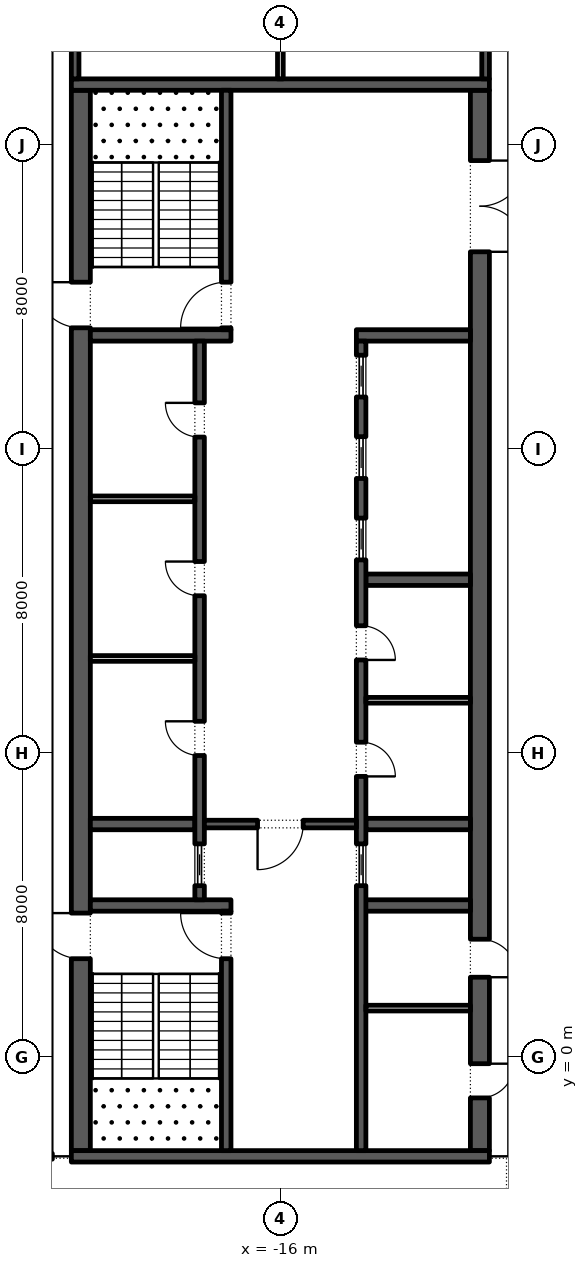
"""IFC4 building model, lengths in metres.
Left out: names, types, materials, properties, quantities, classifications, styles, units other than length and angle.
Written with IfcOpenShell. Run it as: python <this file> out.ifc"""

import sys

from ifc_helpers import new_model, si_unit, direction, frame, frame_2d, origin, place, context, subcontext, project, spatial, rectangle, extrude, element, fill, save


model = new_model("IFC4")
c1 = context("Model", 3, precision=1e-05, world=origin(), true_north=direction((0.0, 1.0)))
c2 = subcontext(c1, "Body", "Model", "MODEL_VIEW")
j1 = project(units=[si_unit("LENGTHUNIT", "METRE"), si_unit("PLANEANGLEUNIT", "RADIAN")], contexts=[c1])
p1 = place(None, origin())
s1 = spatial("IfcSite", under=j1, at=p1, CompositionType="ELEMENT")
p2 = place(p1, origin())
s2 = spatial("IfcBuilding", under=s1, at=p2, CompositionType="ELEMENT")
p3 = place(p2, frame((0.0, 0.0, 321.6)))
s3 = spatial("IfcBuildingStorey", under=s2, at=p3, CompositionType="ELEMENT", Elevation=321.6)
p4 = place(p3, frame((-21.25, -2.45, 0.0), z_axis=(0.0, 0.0, 1.0), x_axis=(0.0, 1.0, 0.0)))
e1 = element("IfcWall", 1, at=p4, inside=s3, PredefinedType="SHEAR", context=c2, shape_type="SweptSolid", body=[
    extrude(rectangle(XDim=27.9, YDim=0.5, at=frame_2d((13.95, 0.0))), origin(), (0.0, 0.0, 1.0), 4.0),
])
p5 = place(p4, frame((5.05, 0.0, 0.0)))
e2 = element("IfcOpeningElement", 2, at=p5, cuts=e1, PredefinedType="OPENING", context=c2, shape_type="SweptSolid", body=[
    extrude(rectangle(XDim=1.2, YDim=2.1, at=frame_2d((0.6, 1.05))), frame((0.0, 0.26, 0.0), z_axis=(0.0, -1.0, 0.0), x_axis=(1.0, 0.0, 0.0)), (0.0, 0.0, 1.0), 0.52),
])
p6 = place(p4, frame((21.65, 0.0, 0.0)))
e3 = element("IfcOpeningElement", 3, at=p6, cuts=e1, PredefinedType="OPENING", context=c2, shape_type="SweptSolid", body=[
    extrude(rectangle(XDim=1.2, YDim=2.1, at=frame_2d((0.6, 1.05))), frame((0.0, 0.26, 0.0), z_axis=(0.0, -1.0, 0.0), x_axis=(1.0, 0.0, 0.0)), (0.0, 0.0, 1.0), 0.52),
])
p7 = place(p3, frame((-10.75, -2.45, 0.0), z_axis=(0.0, 0.0, 1.0), x_axis=(0.0, 1.0, 0.0)))
e4 = element("IfcWall", 4, at=p7, inside=s3, PredefinedType="SHEAR", context=c2, shape_type="SweptSolid", body=[
    extrude(rectangle(XDim=27.9, YDim=0.5, at=frame_2d((13.95, 0.0))), origin(), (0.0, 0.0, 1.0), 4.0),
])
p8 = place(p7, frame((23.65, 0.0, 0.0)))
e5 = element("IfcOpeningElement", 5, at=p8, cuts=e4, PredefinedType="OPENING", context=c2, shape_type="SweptSolid", body=[
    extrude(rectangle(XDim=2.4, YDim=2.1, at=frame_2d((1.2, 1.05))), frame((0.0, 0.26, 0.0), z_axis=(0.0, -1.0, 0.0), x_axis=(1.0, 0.0, 0.0)), (0.0, 0.0, 1.0), 0.52),
])
p9 = place(p7, frame((1.387, 0.0, 0.0)))
e6 = element("IfcOpeningElement", 6, at=p9, cuts=e4, PredefinedType="OPENING", context=c2, shape_type="SweptSolid", body=[
    extrude(rectangle(XDim=0.9, YDim=2.1, at=frame_2d((0.45, 1.05))), frame((0.0, 0.26, 0.0), z_axis=(0.0, -1.0, 0.0), x_axis=(1.0, 0.0, 0.0)), (0.0, 0.0, 1.0), 0.52),
])
p10 = place(p7, frame((4.562, 0.0, 0.0)))
e7 = element("IfcOpeningElement", 7, at=p10, cuts=e4, PredefinedType="OPENING", context=c2, shape_type="SweptSolid", body=[
    extrude(rectangle(XDim=1.0, YDim=2.1, at=frame_2d((0.5, 1.05))), frame((0.0, 0.26, 0.0), z_axis=(0.0, -1.0, 0.0), x_axis=(1.0, 0.0, 0.0)), (0.0, 0.0, 1.0), 0.52),
])
for number, where, z_axis, x_axis in (
    (8, (-21.5, -2.6, 0.0), (0.0, 0.0, 1.0), (1.0, 0.0, 0.0)),
    (9, (-21.5, 25.6, 0.0), (0.0, 0.0, 1.0), (1.0, 0.0, 0.0)),
):
    element("IfcWall", number, at=place(p3, frame(where, z_axis=z_axis, x_axis=x_axis)), inside=s3, PredefinedType="SHEAR", context=c2, shape_type="SweptSolid", body=[
        extrude(rectangle(XDim=11.0, YDim=0.3, at=frame_2d((5.5, 0.0))), origin(), (0.0, 0.0, 1.0), 4.0),
    ])
p11 = place(p3, frame((-21.0, 4.0, 0.0), z_axis=(0.0, 0.0, 1.0), x_axis=(1.0, 0.0, 0.0)))
e10 = element("IfcWall", 10, at=p11, inside=s3, PredefinedType="SHEAR", context=c2, shape_type="SweptSolid", body=[
    extrude(rectangle(XDim=3.7, YDim=0.3, at=frame_2d((1.85, 0.0))), origin(), (0.0, 0.0, 1.0), 4.0),
])
p12 = place(p3, frame((-17.425, -2.45, 0.0), z_axis=(0.0, 0.0, 1.0), x_axis=(0.0, 1.0, 0.0)))
e11 = element("IfcWall", 11, at=p12, inside=s3, PredefinedType="SHEAR", context=c2, shape_type="SweptSolid", body=[
    extrude(rectangle(XDim=6.3, YDim=0.25, at=frame_2d((3.15, 0.0))), origin(), (0.0, 0.0, 1.0), 4.0),
])
p13 = place(p12, frame((5.05, 0.0, 0.0)))
e12 = element("IfcOpeningElement", 12, at=p13, cuts=e11, PredefinedType="OPENING", context=c2, shape_type="SweptSolid", body=[
    extrude(rectangle(XDim=1.2, YDim=2.1, at=frame_2d((0.6, 1.05))), frame((0.0, 0.135, 0.0), z_axis=(0.0, -1.0, 0.0), x_axis=(1.0, 0.0, 0.0)), (0.0, 0.0, 1.0), 0.27),
])
p14 = place(p3, frame((-21.0, 19.0, 0.0), z_axis=(0.0, 0.0, 1.0), x_axis=(1.0, 0.0, 0.0)))
e13 = element("IfcWall", 13, at=p14, inside=s3, PredefinedType="SHEAR", context=c2, shape_type="SweptSolid", body=[
    extrude(rectangle(XDim=3.7, YDim=0.3, at=frame_2d((1.85, 0.0))), origin(), (0.0, 0.0, 1.0), 4.0),
])
p15 = place(p3, frame((-17.425, 19.15, 0.0), z_axis=(0.0, 0.0, 1.0), x_axis=(0.0, 1.0, 0.0)))
e14 = element("IfcWall", 14, at=p15, inside=s3, PredefinedType="SHEAR", context=c2, shape_type="SweptSolid", body=[
    extrude(rectangle(XDim=6.3, YDim=0.25, at=frame_2d((3.15, 0.0))), origin(), (0.0, 0.0, 1.0), 4.0),
])
p16 = place(p15, frame((0.05, 0.0, 0.0)))
e15 = element("IfcOpeningElement", 15, at=p16, cuts=e14, PredefinedType="OPENING", context=c2, shape_type="SweptSolid", body=[
    extrude(rectangle(XDim=1.2, YDim=2.1, at=frame_2d((0.6, 1.05))), frame((0.0, 0.135, 0.0), z_axis=(0.0, -1.0, 0.0), x_axis=(1.0, 0.0, 0.0)), (0.0, 0.0, 1.0), 0.27),
])
p17 = place(p3, frame((-21.0, 6.143, 0.0), z_axis=(0.0, 0.0, 1.0), x_axis=(1.0, 0.0, 0.0)))
e16 = element("IfcWall", 16, at=p17, inside=s3, PredefinedType="SHEAR", context=c2, shape_type="SweptSolid", body=[
    extrude(rectangle(XDim=2.75, YDim=0.3, at=frame_2d((1.375, 0.0))), origin(), (0.0, 0.0, 1.0), 4.0),
])
p18 = place(p3, frame((-18.125, 4.15, 0.0), z_axis=(0.0, 0.0, 1.0), x_axis=(0.0, 1.0, 0.0)))
e17 = element("IfcWall", 17, at=p18, inside=s3, PredefinedType="SHEAR", context=c2, shape_type="SweptSolid", body=[
    extrude(rectangle(XDim=14.7, YDim=0.25, at=frame_2d((7.35, 0.0))), origin(), (0.0, 0.0, 1.0), 4.0),
])
p19 = place(p18, frame((3.796, 0.0, 0.0)))
e18 = element("IfcOpeningElement", 18, at=p19, cuts=e17, PredefinedType="OPENING", context=c2, shape_type="SweptSolid", body=[
    extrude(rectangle(XDim=0.9, YDim=2.1, at=frame_2d((0.45, 1.05))), frame((0.0, 0.135, 0.0), z_axis=(0.0, -1.0, 0.0), x_axis=(1.0, 0.0, 0.0)), (0.0, 0.0, 1.0), 0.27),
])
p20 = place(p18, frame((8.0, 0.0, 0.0)))
e19 = element("IfcOpeningElement", 19, at=p20, cuts=e17, PredefinedType="OPENING", context=c2, shape_type="SweptSolid", body=[
    extrude(rectangle(XDim=0.9, YDim=2.1, at=frame_2d((0.45, 1.05))), frame((0.0, 0.135, 0.0), z_axis=(0.0, -1.0, 0.0), x_axis=(1.0, 0.0, 0.0)), (0.0, 0.0, 1.0), 0.27),
])
p21 = place(p18, frame((12.175, 0.0, 0.0)))
e20 = element("IfcOpeningElement", 20, at=p21, cuts=e17, PredefinedType="OPENING", context=c2, shape_type="SweptSolid", body=[
    extrude(rectangle(XDim=0.9, YDim=2.1, at=frame_2d((0.45, 1.05))), frame((0.0, 0.135, 0.0), z_axis=(0.0, -1.0, 0.0), x_axis=(1.0, 0.0, 0.0)), (0.0, 0.0, 1.0), 0.27),
])
p22 = place(p18, frame((0.371, 0.0, 0.0)))
e21 = element("IfcOpeningElement", 21, at=p22, cuts=e17, PredefinedType="OPENING", context=c2, shape_type="SweptSolid", body=[
    extrude(rectangle(XDim=1.1, YDim=2.1, at=frame_2d((0.55, 1.05))), frame((0.0, 0.135, 0.0), z_axis=(0.0, -1.0, 0.0), x_axis=(1.0, 0.0, 0.0)), (0.0, 0.0, 1.0), 0.27),
])
for number, where, z_axis, x_axis in (
    (22, (-21.0, 10.5, 0.0), (0.0, 0.0, 1.0), (1.0, 0.0, 0.0)),
    (23, (-21.0, 14.7, 0.0), (0.0, 0.0, 1.0), (1.0, 0.0, 0.0)),
):
    element("IfcWall", number, at=place(p3, frame(where, z_axis=z_axis, x_axis=x_axis)), inside=s3, PredefinedType="PARTITIONING", context=c2, shape_type="SweptSolid", body=[
        extrude(rectangle(XDim=2.75, YDim=0.15, at=frame_2d((1.375, 0.0))), origin(), (0.0, 0.0, 1.0), 4.0),
    ])
p23 = place(p3, frame((-14.0, 4.0, 0.0), z_axis=(0.0, 0.0, 1.0), x_axis=(1.0, 0.0, 0.0)))
e24 = element("IfcWall", 24, at=p23, inside=s3, PredefinedType="SHEAR", context=c2, shape_type="SweptSolid", body=[
    extrude(rectangle(XDim=3.0, YDim=0.3, at=frame_2d((1.5, 0.0))), origin(), (0.0, 0.0, 1.0), 4.0),
])
for number, where, z_axis, x_axis in (
    (25, (-13.75, 6.143, 0.0), (0.0, 0.0, 1.0), (1.0, 0.0, 0.0)),
    (26, (-13.75, 12.571, 0.0), (0.0, 0.0, 1.0), (1.0, 0.0, 0.0)),
):
    element("IfcWall", number, at=place(p3, frame(where, z_axis=z_axis, x_axis=x_axis)), inside=s3, PredefinedType="SHEAR", context=c2, shape_type="SweptSolid", body=[
        extrude(rectangle(XDim=2.75, YDim=0.3, at=frame_2d((1.375, 0.0))), origin(), (0.0, 0.0, 1.0), 4.0),
    ])
p24 = place(p3, frame((-14.0, 19.0, 0.0), z_axis=(0.0, 0.0, 1.0), x_axis=(1.0, 0.0, 0.0)))
e27 = element("IfcWall", 27, at=p24, inside=s3, PredefinedType="SHEAR", context=c2, shape_type="SweptSolid", body=[
    extrude(rectangle(XDim=3.0, YDim=0.3, at=frame_2d((1.5, 0.0))), origin(), (0.0, 0.0, 1.0), 4.0),
])
p25 = place(p3, frame((-13.875, -2.45, 0.0), z_axis=(0.0, 0.0, 1.0), x_axis=(0.0, 1.0, 0.0)))
e28 = element("IfcWall", 28, at=p25, inside=s3, PredefinedType="SHEAR", context=c2, shape_type="SweptSolid", body=[
    extrude(rectangle(XDim=21.3, YDim=0.25, at=frame_2d((10.65, 0.0))), origin(), (0.0, 0.0, 1.0), 4.0),
])
p26 = place(p25, frame((9.846, 0.0, 0.0)))
e29 = element("IfcOpeningElement", 29, at=p26, cuts=e28, PredefinedType="OPENING", context=c2, shape_type="SweptSolid", body=[
    extrude(rectangle(XDim=0.9, YDim=2.1, at=frame_2d((0.45, 1.05))), frame((0.0, 0.135, 0.0), z_axis=(0.0, -1.0, 0.0), x_axis=(1.0, 0.0, 0.0)), (0.0, 0.0, 1.0), 0.27),
])
p27 = place(p25, frame((12.911, 0.0, 0.0)))
e30 = element("IfcOpeningElement", 30, at=p27, cuts=e28, PredefinedType="OPENING", context=c2, shape_type="SweptSolid", body=[
    extrude(rectangle(XDim=0.9, YDim=2.1, at=frame_2d((0.45, 1.05))), frame((0.0, 0.135, 0.0), z_axis=(0.0, -1.0, 0.0), x_axis=(1.0, 0.0, 0.0)), (0.0, 0.0, 1.0), 0.27),
])
p28 = place(p25, frame((6.971, 0.0, 0.0)))
e31 = element("IfcOpeningElement", 31, at=p28, cuts=e28, PredefinedType="OPENING", context=c2, shape_type="SweptSolid", body=[
    extrude(rectangle(XDim=1.1, YDim=2.1, at=frame_2d((0.55, 1.05))), frame((0.0, 0.135, 0.0), z_axis=(0.0, -1.0, 0.0), x_axis=(1.0, 0.0, 0.0)), (0.0, 0.0, 1.0), 0.27),
])
p29 = place(p25, frame((15.543, 0.0, 0.0)))
e32 = element("IfcOpeningElement", 32, at=p29, cuts=e28, PredefinedType="OPENING", context=c2, shape_type="SweptSolid", body=[
    extrude(rectangle(XDim=1.1, YDim=2.1, at=frame_2d((0.55, 1.05))), frame((0.0, 0.135, 0.0), z_axis=(0.0, -1.0, 0.0), x_axis=(1.0, 0.0, 0.0)), (0.0, 0.0, 1.0), 0.27),
])
p30 = place(p25, frame((17.686, 0.0, 0.0)))
e33 = element("IfcOpeningElement", 33, at=p30, cuts=e28, PredefinedType="OPENING", context=c2, shape_type="SweptSolid", body=[
    extrude(rectangle(XDim=1.1, YDim=2.1, at=frame_2d((0.55, 1.05))), frame((0.0, 0.135, 0.0), z_axis=(0.0, -1.0, 0.0), x_axis=(1.0, 0.0, 0.0)), (0.0, 0.0, 1.0), 0.27),
])
p31 = place(p25, frame((19.829, 0.0, 0.0)))
e34 = element("IfcOpeningElement", 34, at=p31, cuts=e28, PredefinedType="OPENING", context=c2, shape_type="SweptSolid", body=[
    extrude(rectangle(XDim=1.1, YDim=2.1, at=frame_2d((0.55, 1.05))), frame((0.0, 0.135, 0.0), z_axis=(0.0, -1.0, 0.0), x_axis=(1.0, 0.0, 0.0)), (0.0, 0.0, 1.0), 0.27),
])
p32 = place(p3, frame((-13.75, 9.4, 0.0), z_axis=(0.0, 0.0, 1.0), x_axis=(1.0, 0.0, 0.0)))
e35 = element("IfcWall", 35, at=p32, inside=s3, PredefinedType="PARTITIONING", context=c2, shape_type="SweptSolid", body=[
    extrude(rectangle(XDim=2.75, YDim=0.15, at=frame_2d((1.375, 0.0))), origin(), (0.0, 0.0, 1.0), 4.0),
])
p33 = place(p3, frame((-18.0, 6.143, 0.0), z_axis=(0.0, 0.0, 1.0), x_axis=(1.0, 0.0, 0.0)))
e36 = element("IfcWall", 36, at=p33, inside=s3, PredefinedType="SHEAR", context=c2, shape_type="SweptSolid", body=[
    extrude(rectangle(XDim=4.0, YDim=0.2, at=frame_2d((2.0, 0.0))), origin(), (0.0, 0.0, 1.0), 4.0),
])
p34 = place(p33, frame((1.4, 0.0, 0.0)))
e37 = element("IfcOpeningElement", 37, at=p34, cuts=e36, PredefinedType="OPENING", context=c2, shape_type="SweptSolid", body=[
    extrude(rectangle(XDim=1.2, YDim=2.1, at=frame_2d((0.6, 1.05))), frame((0.0, 0.11, 0.0), z_axis=(0.0, -1.0, 0.0), x_axis=(1.0, 0.0, 0.0)), (0.0, 0.0, 1.0), 0.22),
])
p35 = place(p3, frame((-13.75, 1.3, 0.0), z_axis=(0.0, 0.0, 1.0), x_axis=(1.0, 0.0, 0.0)))
e38 = element("IfcWall", 38, at=p35, inside=s3, PredefinedType="PARTITIONING", context=c2, shape_type="SweptSolid", body=[
    extrude(rectangle(XDim=2.75, YDim=0.15, at=frame_2d((1.375, 0.0))), origin(), (0.0, 0.0, 1.0), 4.0),
])
p36 = place(p3, frame((-21.4, 25.75, 0.0), z_axis=(0.0, 0.0, 1.0), x_axis=(0.0, 1.0, 0.0)))
e39 = element("IfcWall", 39, at=p36, inside=s3, PredefinedType="SHEAR", context=c2, shape_type="SweptSolid", body=[
    extrude(rectangle(XDim=15.05, YDim=0.2, at=frame_2d((7.525, 0.0))), origin(), (0.0, 0.0, 1.0), 4.0),
])
p37 = place(p36, frame((7.075, 0.0, 0.0)))
e40 = element("IfcOpeningElement", 40, at=p37, cuts=e39, PredefinedType="OPENING", context=c2, shape_type="SweptSolid", body=[
    extrude(rectangle(XDim=0.9, YDim=2.1, at=frame_2d((0.45, 1.05))), frame((0.0, 0.11, 0.0), z_axis=(0.0, -1.0, 0.0), x_axis=(1.0, 0.0, 0.0)), (0.0, 0.0, 1.0), 0.22),
])
p38 = place(p3, frame((-10.6, 25.75, 0.0), z_axis=(0.0, 0.0, 1.0), x_axis=(0.0, 1.0, 0.0)))
e41 = element("IfcWall", 41, at=p38, inside=s3, PredefinedType="SHEAR", context=c2, shape_type="SweptSolid", body=[
    extrude(rectangle(XDim=15.05, YDim=0.2, at=frame_2d((7.525, 0.0))), origin(), (0.0, 0.0, 1.0), 4.0),
])
p39 = place(p38, frame((7.075, 0.0, 0.0)))
e42 = element("IfcOpeningElement", 42, at=p39, cuts=e41, PredefinedType="OPENING", context=c2, shape_type="SweptSolid", body=[
    extrude(rectangle(XDim=0.9, YDim=2.1, at=frame_2d((0.45, 1.05))), frame((0.0, 0.11, 0.0), z_axis=(0.0, -1.0, 0.0), x_axis=(1.0, 0.0, 0.0)), (0.0, 0.0, 1.0), 0.22),
])
p40 = place(p3, frame((-16.0, 25.75, 0.0), z_axis=(0.0, 0.0, 1.0), x_axis=(0.0, 1.0, 0.0)))
e43 = element("IfcWall", 43, at=p40, inside=s3, PredefinedType="PARTITIONING", context=c2, shape_type="SweptSolid", body=[
    extrude(rectangle(XDim=15.05, YDim=0.15, at=frame_2d((7.525, 0.0))), origin(), (0.0, 0.0, 1.0), 4.0),
])
p41 = place(p19, origin())
e44 = element("IfcDoor", 44, at=p41, inside=s3, OperationType="SINGLE_SWING_LEFT", PredefinedType="DOOR", context=c2, shape_type="SweptSolid", body=[
    extrude(rectangle(XDim=0.9, YDim=2.1, at=frame_2d((0.45, 1.05))), frame((0.0, 0.125, 0.0), z_axis=(0.0, -1.0, 0.0), x_axis=(1.0, 0.0, 0.0)), (0.0, 0.0, 1.0), 0.05),
])
fill(e18, e44)
p42 = place(p20, origin())
e45 = element("IfcDoor", 45, at=p42, inside=s3, OperationType="SINGLE_SWING_LEFT", PredefinedType="DOOR", context=c2, shape_type="SweptSolid", body=[
    extrude(rectangle(XDim=0.9, YDim=2.1, at=frame_2d((0.45, 1.05))), frame((0.0, 0.125, 0.0), z_axis=(0.0, -1.0, 0.0), x_axis=(1.0, 0.0, 0.0)), (0.0, 0.0, 1.0), 0.05),
])
fill(e19, e45)
p43 = place(p21, origin())
e46 = element("IfcDoor", 46, at=p43, inside=s3, OperationType="SINGLE_SWING_LEFT", PredefinedType="DOOR", context=c2, shape_type="SweptSolid", body=[
    extrude(rectangle(XDim=0.9, YDim=2.1, at=frame_2d((0.45, 1.05))), frame((0.0, 0.125, 0.0), z_axis=(0.0, -1.0, 0.0), x_axis=(1.0, 0.0, 0.0)), (0.0, 0.0, 1.0), 0.05),
])
fill(e20, e46)
p44 = place(p22, origin())
e47 = element("IfcDoor", 47, at=p44, inside=s3, OperationType="SLIDING_TO_LEFT", PredefinedType="DOOR", context=c2, shape_type="SweptSolid", body=[
    extrude(rectangle(XDim=1.1, YDim=2.1, at=frame_2d((0.55, 1.05))), frame((0.0, 0.025, 0.0), z_axis=(0.0, -1.0, 0.0), x_axis=(1.0, 0.0, 0.0)), (0.0, 0.0, 1.0), 0.05),
])
fill(e21, e47)
p45 = place(p26, frame((0.9, -0.2, 0.0), z_axis=(0.0, 0.0, 1.0), x_axis=(-1.0, 0.0, 0.0)))
e48 = element("IfcDoor", 48, at=p45, inside=s3, OperationType="SINGLE_SWING_LEFT", PredefinedType="DOOR", context=c2, shape_type="SweptSolid", body=[
    extrude(rectangle(XDim=0.9, YDim=2.1, at=frame_2d((0.45, 1.05))), frame((0.0, -0.075, 0.0), z_axis=(0.0, -1.0, 0.0), x_axis=(1.0, 0.0, 0.0)), (0.0, 0.0, 1.0), 0.05),
])
fill(e29, e48)
p46 = place(p27, frame((0.9, -0.2, 0.0), z_axis=(0.0, 0.0, 1.0), x_axis=(-1.0, 0.0, 0.0)))
e49 = element("IfcDoor", 49, at=p46, inside=s3, OperationType="SINGLE_SWING_LEFT", PredefinedType="DOOR", context=c2, shape_type="SweptSolid", body=[
    extrude(rectangle(XDim=0.9, YDim=2.1, at=frame_2d((0.45, 1.05))), frame((0.0, -0.075, 0.0), z_axis=(0.0, -1.0, 0.0), x_axis=(1.0, 0.0, 0.0)), (0.0, 0.0, 1.0), 0.05),
])
fill(e30, e49)
p47 = place(p28, origin())
e50 = element("IfcDoor", 50, at=p47, inside=s3, OperationType="SLIDING_TO_LEFT", PredefinedType="DOOR", context=c2, shape_type="SweptSolid", body=[
    extrude(rectangle(XDim=1.1, YDim=2.1, at=frame_2d((0.55, 1.05))), frame((0.0, 0.025, 0.0), z_axis=(0.0, -1.0, 0.0), x_axis=(1.0, 0.0, 0.0)), (0.0, 0.0, 1.0), 0.05),
])
fill(e31, e50)
p48 = place(p29, origin())
e51 = element("IfcDoor", 51, at=p48, inside=s3, OperationType="SLIDING_TO_LEFT", PredefinedType="DOOR", context=c2, shape_type="SweptSolid", body=[
    extrude(rectangle(XDim=1.1, YDim=2.1, at=frame_2d((0.55, 1.05))), frame((0.0, 0.025, 0.0), z_axis=(0.0, -1.0, 0.0), x_axis=(1.0, 0.0, 0.0)), (0.0, 0.0, 1.0), 0.05),
])
fill(e32, e51)
p49 = place(p30, origin())
e52 = element("IfcDoor", 52, at=p49, inside=s3, OperationType="SLIDING_TO_LEFT", PredefinedType="DOOR", context=c2, shape_type="SweptSolid", body=[
    extrude(rectangle(XDim=1.1, YDim=2.1, at=frame_2d((0.55, 1.05))), frame((0.0, 0.025, 0.0), z_axis=(0.0, -1.0, 0.0), x_axis=(1.0, 0.0, 0.0)), (0.0, 0.0, 1.0), 0.05),
])
fill(e33, e52)
p50 = place(p31, origin())
e53 = element("IfcDoor", 53, at=p50, inside=s3, OperationType="SLIDING_TO_LEFT", PredefinedType="DOOR", context=c2, shape_type="SweptSolid", body=[
    extrude(rectangle(XDim=1.1, YDim=2.1, at=frame_2d((0.55, 1.05))), frame((0.0, 0.025, 0.0), z_axis=(0.0, -1.0, 0.0), x_axis=(1.0, 0.0, 0.0)), (0.0, 0.0, 1.0), 0.05),
])
fill(e34, e53)
p51 = place(p34, frame((1.2, 0.0, 0.0), z_axis=(0.0, 0.0, 1.0), x_axis=(-1.0, 0.0, 0.0)))
e54 = element("IfcDoor", 54, at=p51, inside=s3, OperationType="SINGLE_SWING_LEFT", PredefinedType="DOOR", context=c2, shape_type="SweptSolid", body=[
    extrude(rectangle(XDim=1.2, YDim=2.1, at=frame_2d((0.6, 1.05))), frame((0.0, 0.025, 0.0), z_axis=(0.0, -1.0, 0.0), x_axis=(1.0, 0.0, 0.0)), (0.0, 0.0, 1.0), 0.05),
])
fill(e37, e54)
p52 = place(p8, frame((2.4, 0.0, 0.0), z_axis=(0.0, 0.0, 1.0), x_axis=(-1.0, 0.0, 0.0)))
e55 = element("IfcDoor", 55, at=p52, inside=s3, OperationType="DOUBLE_DOOR_SINGLE_SWING", PredefinedType="DOOR", context=c2, shape_type="SweptSolid", body=[
    extrude(rectangle(XDim=2.4, YDim=2.1, at=frame_2d((1.2, 1.05))), frame((0.0, 0.025, 0.0), z_axis=(0.0, -1.0, 0.0), x_axis=(1.0, 0.0, 0.0)), (0.0, 0.0, 1.0), 0.05),
])
fill(e5, e55)
p53 = place(p13, origin())
e56 = element("IfcDoor", 56, at=p53, inside=s3, OperationType="SINGLE_SWING_LEFT", PredefinedType="DOOR", context=c2, shape_type="SweptSolid", body=[
    extrude(rectangle(XDim=1.2, YDim=2.1, at=frame_2d((0.6, 1.05))), frame((0.0, 0.025, 0.0), z_axis=(0.0, -1.0, 0.0), x_axis=(1.0, 0.0, 0.0)), (0.0, 0.0, 1.0), 0.05),
])
fill(e12, e56)
p54 = place(p5, origin())
e57 = element("IfcDoor", 57, at=p54, inside=s3, OperationType="SINGLE_SWING_LEFT", PredefinedType="DOOR", context=c2, shape_type="SweptSolid", body=[
    extrude(rectangle(XDim=1.2, YDim=2.1, at=frame_2d((0.6, 1.05))), frame((0.0, 0.025, 0.0), z_axis=(0.0, -1.0, 0.0), x_axis=(1.0, 0.0, 0.0)), (0.0, 0.0, 1.0), 0.05),
])
fill(e2, e57)
p55 = place(p16, origin())
e58 = element("IfcDoor", 58, at=p55, inside=s3, OperationType="SINGLE_SWING_RIGHT", PredefinedType="DOOR", context=c2, shape_type="SweptSolid", body=[
    extrude(rectangle(XDim=1.2, YDim=2.1, at=frame_2d((0.6, 1.05))), frame((0.0, 0.025, 0.0), z_axis=(0.0, -1.0, 0.0), x_axis=(1.0, 0.0, 0.0)), (0.0, 0.0, 1.0), 0.05),
])
fill(e15, e58)
p56 = place(p6, origin())
e59 = element("IfcDoor", 59, at=p56, inside=s3, OperationType="SINGLE_SWING_LEFT", PredefinedType="DOOR", context=c2, shape_type="SweptSolid", body=[
    extrude(rectangle(XDim=1.2, YDim=2.1, at=frame_2d((0.6, 1.05))), frame((0.0, 0.025, 0.0), z_axis=(0.0, -1.0, 0.0), x_axis=(1.0, 0.0, 0.0)), (0.0, 0.0, 1.0), 0.05),
])
fill(e3, e59)
p57 = place(p9, frame((0.9, 0.45, 0.0), z_axis=(0.0, 0.0, 1.0), x_axis=(-1.0, 0.0, 0.0)))
e60 = element("IfcDoor", 60, at=p57, inside=s3, OperationType="SINGLE_SWING_RIGHT", PredefinedType="DOOR", context=c2, shape_type="SweptSolid", body=[
    extrude(rectangle(XDim=0.9, YDim=2.1, at=frame_2d((0.45, 1.05))), frame((0.0, 0.25, 0.0), z_axis=(0.0, -1.0, 0.0), x_axis=(1.0, 0.0, 0.0)), (0.0, 0.0, 1.0), 0.05),
])
fill(e6, e60)
p58 = place(p10, frame((1.0, 0.45, 0.0), z_axis=(0.0, 0.0, 1.0), x_axis=(-1.0, 0.0, 0.0)))
e61 = element("IfcDoor", 61, at=p58, inside=s3, OperationType="SINGLE_SWING_LEFT", PredefinedType="DOOR", context=c2, shape_type="SweptSolid", body=[
    extrude(rectangle(XDim=1.0, YDim=2.1, at=frame_2d((0.5, 1.05))), frame((0.0, 0.25, 0.0), z_axis=(0.0, -1.0, 0.0), x_axis=(1.0, 0.0, 0.0)), (0.0, 0.0, 1.0), 0.05),
])
fill(e7, e61)
save(model, sys.argv[1])
